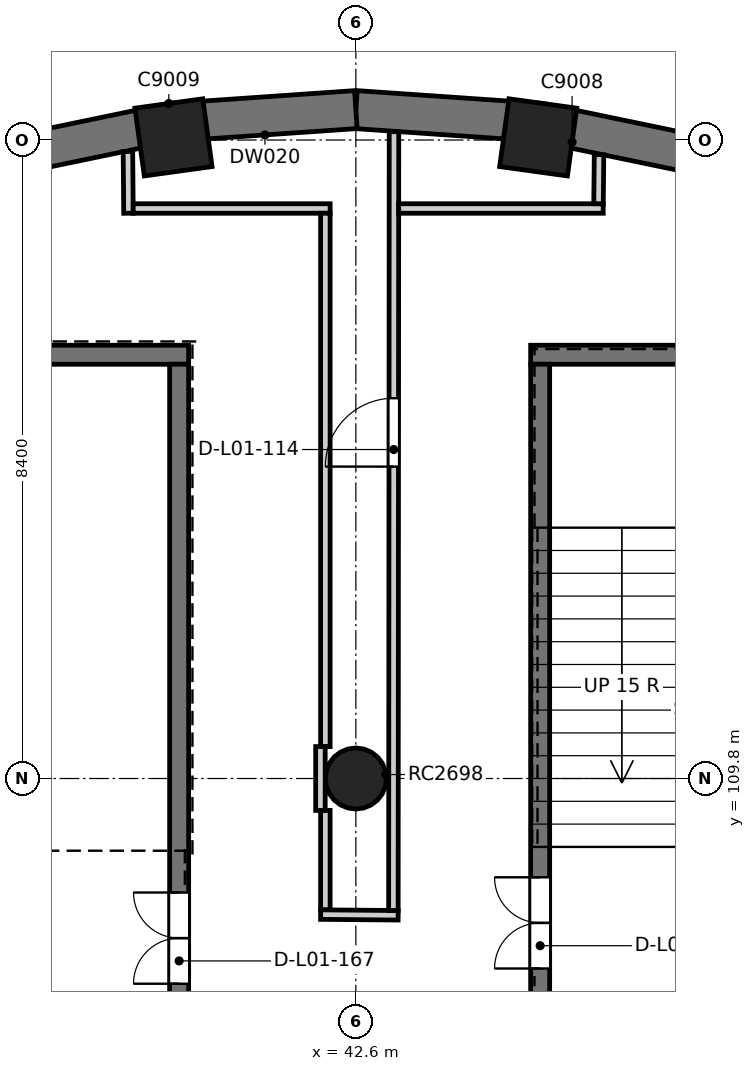
"""IFC4 building model, lengths in metres.
Left out: names, types, materials, properties, quantities, classifications, styles, units other than length and angle.
Written with IfcOpenShell. Run it as: python <this file> out.ifc"""

import sys

from ifc_helpers import new_model, si_unit, direction, frame, frame_2d, origin, origin_2d, place, context, subcontext, project, spatial, rectangle, circle, extrude, element, fill, save


model = new_model("IFC4")
c1 = context("Model", 3, precision=1e-05, world=origin(), true_north=direction((0.0, 1.0)))
c2 = subcontext(c1, "Body", "Model", "MODEL_VIEW")
j1 = project(units=[si_unit("LENGTHUNIT", "METRE"), si_unit("PLANEANGLEUNIT", "RADIAN")], contexts=[c1])
p1 = place(None, origin())
s1 = spatial("IfcSite", under=j1, at=p1, CompositionType="ELEMENT")
p2 = place(p1, origin())
s2 = spatial("IfcBuilding", under=s1, at=p2, CompositionType="ELEMENT")
p3 = place(p2, frame((0.0, 0.0, 4.8)))
s3 = spatial("IfcBuildingStorey", under=s2, at=p3, CompositionType="ELEMENT", Elevation=4.8)
for number, where, z_axis, x_axis in (
    (1, (47.408, 117.939, 0.0), (0.0, 0.0, 1.0), (-0.979, 0.203, 0.0)),
    (2, (45.027, 118.433, 0.0), (0.0, 0.0, 1.0), (-0.998, 0.069, 0.0)),
    (3, (42.6, 118.6, 0.0), (0.0, 0.0, 1.0), (-0.998, -0.069, 0.0)),
    (4, (40.174, 118.433, 0.0), (0.0, 0.0, 1.0), (-0.979, -0.203, 0.0)),
):
    element("IfcWall", number, at=place(p3, frame(where, z_axis=z_axis, x_axis=x_axis)), inside=s3, PredefinedType="SOLIDWALL", context=c2, shape_type="SweptSolid", body=[
        extrude(rectangle(XDim=2.432, YDim=0.5, at=frame_2d((1.216, 0.0))), origin(), (0.0, 0.0, 1.0), 4.8),
    ])
for number, where, z_axis, x_axis in (
    (5, (44.999, 118.235, 0.0), (0.0, 0.0, 1.0), (0.137, 0.991, 0.0)),
    (6, (40.201, 118.235, 0.0), (0.0, 0.0, 1.0), (0.991, 0.137, 0.0)),
):
    element("IfcColumn", number, at=place(p3, frame(where, z_axis=z_axis, x_axis=x_axis)), inside=s3, PredefinedType="COLUMN", context=c2, shape_type="SweptSolid", body=[
        extrude(rectangle(XDim=0.9, YDim=0.9, at=origin_2d()), origin(), (0.0, 0.0, 1.0), 4.8),
    ])
p4 = place(p3, frame((42.6, 109.8, 0.0), z_axis=(0.0, 0.0, 1.0), x_axis=(1.0, 0.0, 0.0)))
e7 = element("IfcColumn", 7, at=p4, inside=s3, PredefinedType="COLUMN", context=c2, shape_type="SweptSolid", body=[
    extrude(circle(Radius=0.4, at=origin_2d()), origin(), (0.0, 0.0, 1.0), 4.8),
])
p5 = place(p3, frame((35.2, 115.375, 0.0), z_axis=(0.0, 0.0, 1.0), x_axis=(1.0, 0.0, 0.0)))
e8 = element("IfcWall", 8, at=p5, inside=s3, PredefinedType="SOLIDWALL", context=c2, shape_type="SweptSolid", body=[
    extrude(rectangle(XDim=5.2, YDim=0.25, at=frame_2d((2.6, 0.0))), origin(), (0.0, 0.0, 1.0), 4.8),
])
p6 = place(p3, frame((40.275, 106.75, 0.0), z_axis=(0.0, 0.0, 1.0), x_axis=(0.0, 1.0, 0.0)))
e9 = element("IfcWall", 9, at=p6, inside=s3, PredefinedType="SOLIDWALL", context=c2, shape_type="SweptSolid", body=[
    extrude(rectangle(XDim=8.5, YDim=0.25, at=frame_2d((4.25, 0.0))), origin(), (0.0, 0.0, 1.0), 4.8),
])
p7 = place(p6, frame((0.35, 0.0, 0.0)))
e10 = element("IfcOpeningElement", 10, at=p7, cuts=e9, PredefinedType="OPENING", context=c2, shape_type="SweptSolid", body=[
    extrude(rectangle(XDim=1.2, YDim=2.1, at=frame_2d((0.6, 1.05))), frame((0.0, 0.135, 0.0), z_axis=(0.0, -1.0, 0.0), x_axis=(1.0, 0.0, 0.0)), (0.0, 0.0, 1.0), 0.27),
])
p8 = place(p3, frame((44.9, 115.375, 0.0), z_axis=(0.0, 0.0, 1.0), x_axis=(1.0, 0.0, 0.0)))
e11 = element("IfcWall", 11, at=p8, inside=s3, PredefinedType="SOLIDWALL", context=c2, shape_type="SweptSolid", body=[
    extrude(rectangle(XDim=5.2, YDim=0.25, at=frame_2d((2.6, 0.0))), origin(), (0.0, 0.0, 1.0), 4.8),
])
p9 = place(p3, frame((45.025, 106.75, 0.0), z_axis=(0.0, 0.0, 1.0), x_axis=(0.0, 1.0, 0.0)))
e12 = element("IfcWall", 12, at=p9, inside=s3, PredefinedType="SOLIDWALL", context=c2, shape_type="SweptSolid", body=[
    extrude(rectangle(XDim=8.5, YDim=0.25, at=frame_2d((4.25, 0.0))), origin(), (0.0, 0.0, 1.0), 4.8),
])
p10 = place(p9, frame((0.55, 0.0, 0.0)))
e13 = element("IfcOpeningElement", 13, at=p10, cuts=e12, PredefinedType="OPENING", context=c2, shape_type="SweptSolid", body=[
    extrude(rectangle(XDim=1.2, YDim=2.1, at=frame_2d((0.6, 1.05))), frame((0.0, 0.135, 0.0), z_axis=(0.0, -1.0, 0.0), x_axis=(1.0, 0.0, 0.0)), (0.0, 0.0, 1.0), 0.27),
])
p11 = place(p3, frame((39.601, 118.049, 0.0), z_axis=(0.0, 0.0, 1.0), x_axis=(0.009314499757, -0.999956619106, 0.0)))
e14 = element("IfcWall", 14, at=p11, inside=s3, PredefinedType="PARTITIONING", context=c2, shape_type="SweptSolid", body=[
    extrude(rectangle(XDim=0.812, YDim=0.125, at=frame_2d((0.406, 0.0))), origin(), (0.0, 0.0, 1.0), 4.6),
])
p12 = place(p3, frame((39.67, 117.299, 0.0), z_axis=(0.0, 0.0, 1.0), x_axis=(1.0, 0.0, 0.0)))
e15 = element("IfcWall", 15, at=p12, inside=s3, PredefinedType="PARTITIONING", context=c2, shape_type="SweptSolid", body=[
    extrude(rectangle(XDim=2.591, YDim=0.125, at=frame_2d((1.295, 0.0))), origin(), (0.0, 0.0, 1.0), 4.6),
])
p13 = place(p3, frame((42.199, 117.237, 0.0), z_axis=(0.0, 0.0, 1.0), x_axis=(0.0, -1.0, 0.0)))
e16 = element("IfcWall", 16, at=p13, inside=s3, PredefinedType="PARTITIONING", context=c2, shape_type="SweptSolid", body=[
    extrude(rectangle(XDim=7.017, YDim=0.125, at=frame_2d((3.508, 0.0))), origin(), (0.0, 0.0, 1.0), 3.9),
])
p14 = place(p3, frame((42.199, 109.38, 0.0), z_axis=(0.0, 0.0, 1.0), x_axis=(0.0, -1.0, 0.0)))
e17 = element("IfcWall", 17, at=p14, inside=s3, PredefinedType="PARTITIONING", context=c2, shape_type="SweptSolid", body=[
    extrude(rectangle(XDim=1.309, YDim=0.125, at=frame_2d((0.654, 0.0))), origin(), (0.0, 0.0, 1.0), 4.6),
])
p15 = place(p3, frame((42.136, 108.01, 0.0), z_axis=(0.0, 0.0, 1.0), x_axis=(0.999960788718, -0.008855564668, 0.0)))
e18 = element("IfcWall", 18, at=p15, inside=s3, PredefinedType="PARTITIONING", context=c2, shape_type="SweptSolid", body=[
    extrude(rectangle(XDim=1.02, YDim=0.125, at=frame_2d((0.51, 0.0))), origin(), (0.0, 0.0, 1.0), 3.6),
])
p16 = place(p3, frame((43.094, 108.063, 0.0), z_axis=(0.0, 0.0, 1.0), x_axis=(0.000762467314, 0.999999709322, 0.0)))
e19 = element("IfcWall", 19, at=p16, inside=s3, PredefinedType="PARTITIONING", context=c2, shape_type="SweptSolid", body=[
    extrude(rectangle(XDim=10.246, YDim=0.125, at=frame_2d((5.123, 0.0))), origin(), (0.0, 0.0, 1.0), 3.6),
])
p17 = place(p16, frame((5.84, 0.0, 0.0)))
e20 = element("IfcOpeningElement", 20, at=p17, cuts=e19, PredefinedType="OPENING", context=c2, shape_type="SweptSolid", body=[
    extrude(rectangle(XDim=0.9, YDim=2.1, at=frame_2d((0.45, 1.05))), frame((0.0, 0.073, 0.0), z_axis=(0.0, -1.0, 0.0), x_axis=(1.0, 0.0, 0.0)), (0.0, 0.0, 1.0), 0.145),
])
p18 = place(p3, frame((43.164, 117.299, 0.0), z_axis=(0.0, 0.0, 1.0), x_axis=(1.0, 0.0, 0.0)))
e21 = element("IfcWall", 21, at=p18, inside=s3, PredefinedType="PARTITIONING", context=c2, shape_type="SweptSolid", body=[
    extrude(rectangle(XDim=2.691, YDim=0.125, at=frame_2d((1.345, 0.0))), origin(), (0.0, 0.0, 1.0), 4.6),
])
p19 = place(p3, frame((45.793, 117.362, 0.0), z_axis=(0.0, 0.0, 1.0), x_axis=(0.010967570264, 0.999939854393, 0.0)))
e22 = element("IfcWall", 22, at=p19, inside=s3, PredefinedType="PARTITIONING", context=c2, shape_type="SweptSolid", body=[
    extrude(rectangle(XDim=0.646, YDim=0.125, at=frame_2d((0.323, 0.0))), origin(), (0.0, 0.0, 1.0), 4.6),
])
p20 = place(p3, frame((42.134, 110.22, 0.0), z_axis=(0.0, 0.0, 1.0), x_axis=(0.0, -1.0, 0.0)))
e23 = element("IfcWall", 23, at=p20, inside=s3, PredefinedType="PARTITIONING", context=c2, shape_type="SweptSolid", body=[
    extrude(rectangle(XDim=0.84, YDim=0.125, at=frame_2d((0.42, 0.0))), origin(), (0.0, 0.0, 1.0), 3.9),
])
p21 = place(p17, origin())
e24 = element("IfcDoor", 24, at=p21, inside=s3, OperationType="SINGLE_SWING_LEFT", PredefinedType="DOOR", context=c2, shape_type="SweptSolid", body=[
    extrude(rectangle(XDim=0.9, YDim=2.1, at=frame_2d((0.45, 1.05))), frame((0.0, 0.025, 0.0), z_axis=(0.0, -1.0, 0.0), x_axis=(1.0, 0.0, 0.0)), (0.0, 0.0, 1.0), 0.05),
])
fill(e20, e24)
p22 = place(p7, origin())
e25 = element("IfcDoor", 25, at=p22, inside=s3, OperationType="DOUBLE_DOOR_SINGLE_SWING", PredefinedType="DOOR", context=c2, shape_type="SweptSolid", body=[
    extrude(rectangle(XDim=1.2, YDim=2.1, at=frame_2d((0.6, 1.05))), frame((0.0, 0.025, 0.0), z_axis=(0.0, -1.0, 0.0), x_axis=(1.0, 0.0, 0.0)), (0.0, 0.0, 1.0), 0.05),
])
fill(e10, e25)
p23 = place(p10, origin())
e26 = element("IfcDoor", 26, at=p23, inside=s3, OperationType="DOUBLE_DOOR_SINGLE_SWING", PredefinedType="DOOR", context=c2, shape_type="SweptSolid", body=[
    extrude(rectangle(XDim=1.2, YDim=2.1, at=frame_2d((0.6, 1.05))), frame((0.0, 0.025, 0.0), z_axis=(0.0, -1.0, 0.0), x_axis=(1.0, 0.0, 0.0)), (0.0, 0.0, 1.0), 0.05),
])
fill(e13, e26)
save(model, sys.argv[1])
